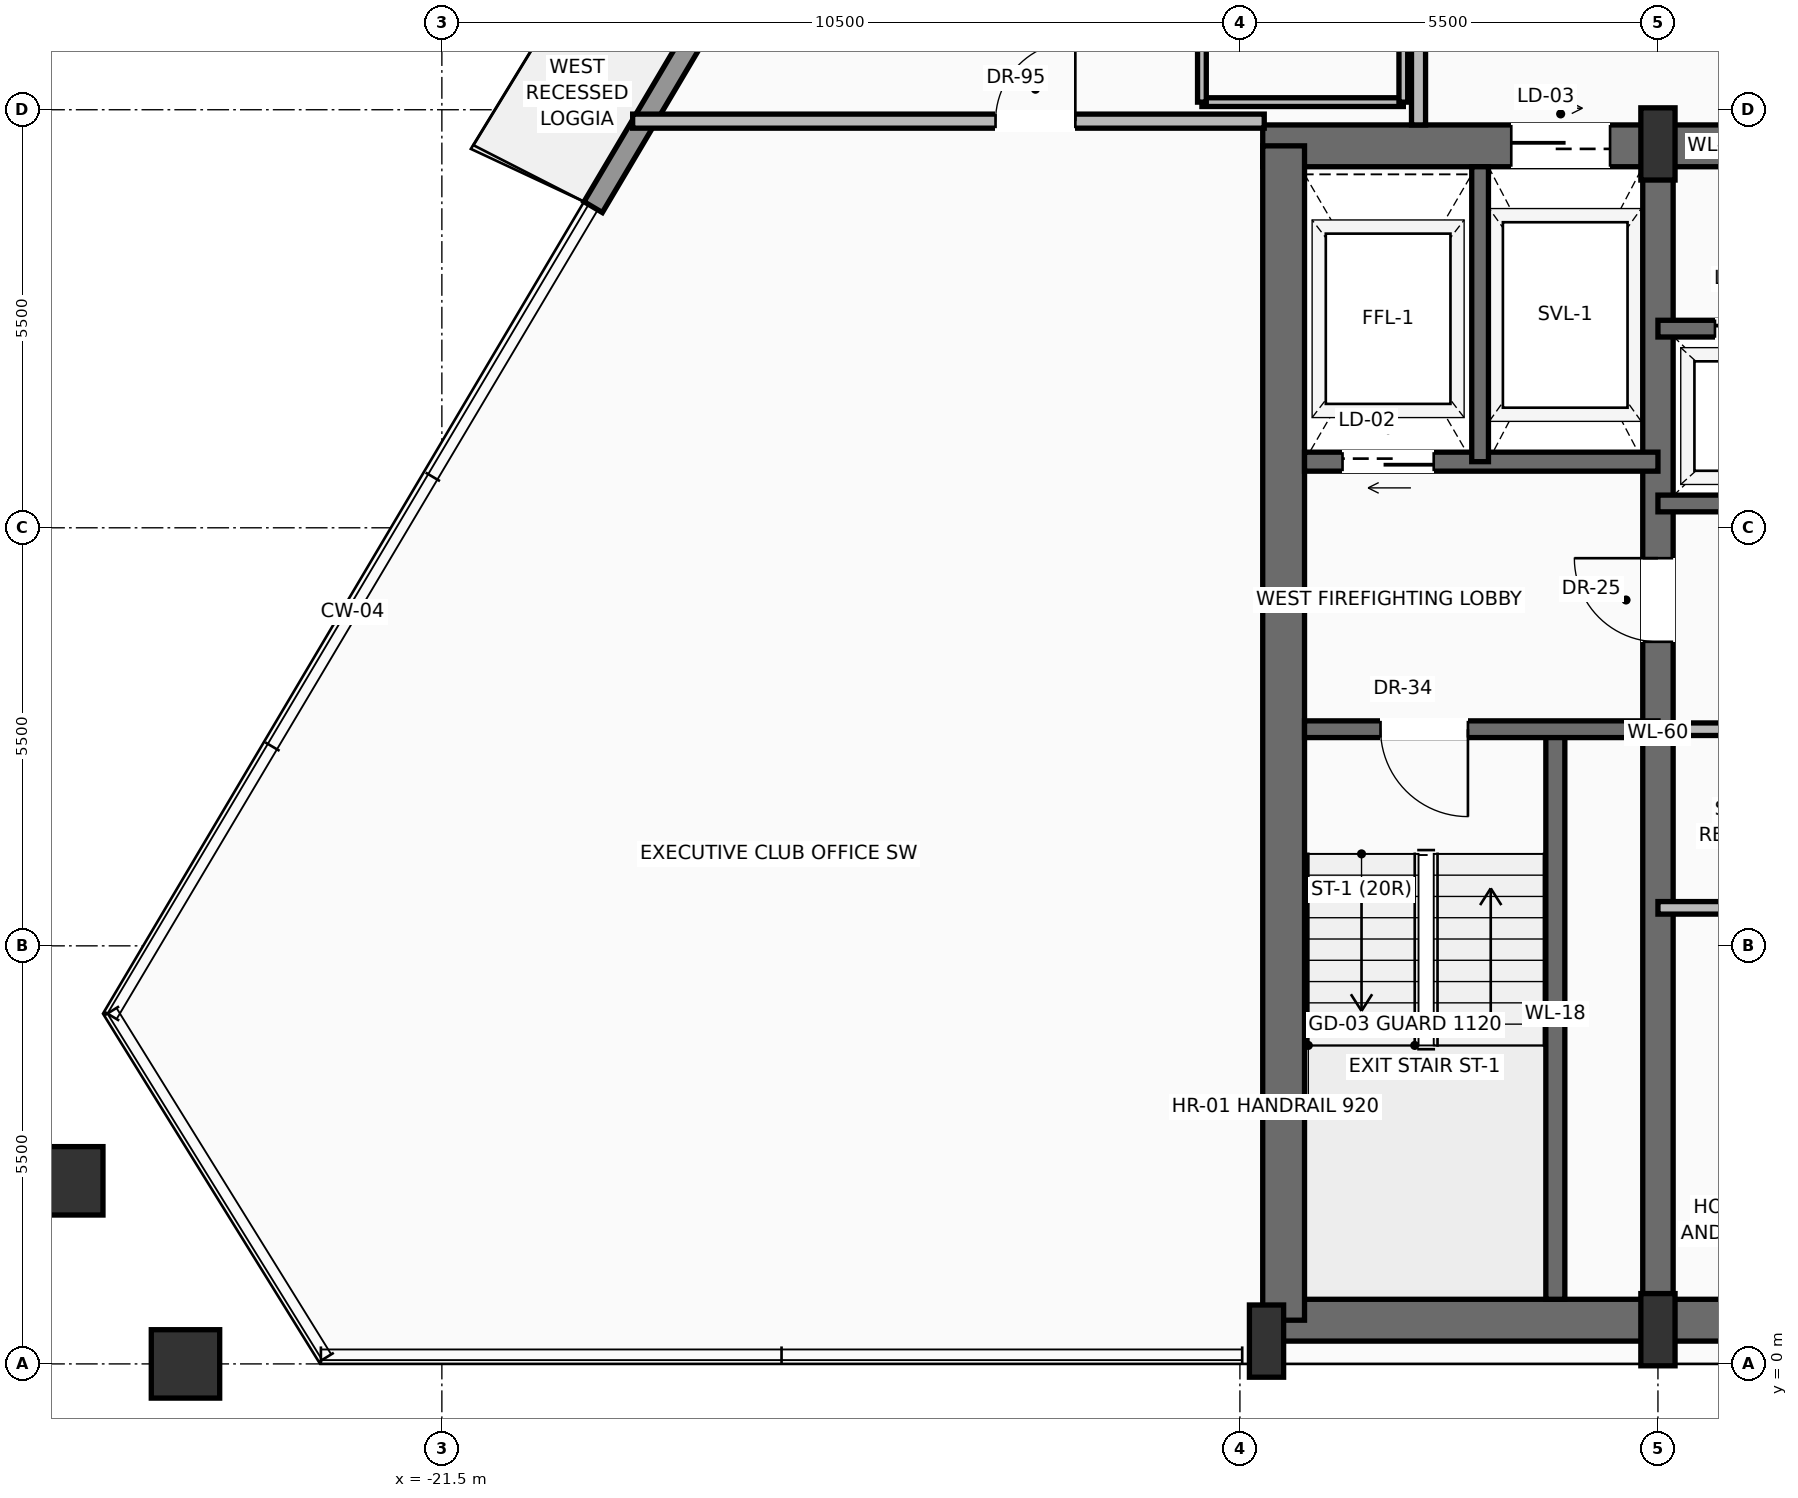
"""IFC4 building model, lengths in metres.
Left out: names, types, materials, properties, quantities, classifications, styles, units other than length and angle.
Written with IfcOpenShell. Run it as: python <this file> out.ifc"""

import sys

from ifc_helpers import new_model, si_unit, direction, frame, frame_2d, origin, origin_2d, place, context, subcontext, project, spatial, rectangle, hollow_rectangle, extrude, source, transform, mapped, element, fill, save


model = new_model("IFC4")
c1 = context("Model", 3, precision=1e-05, world=origin(), true_north=direction((0.0, 1.0)))
c2 = subcontext(c1, "Body", "Model", "MODEL_VIEW")
j1 = project(units=[si_unit("LENGTHUNIT", "METRE"), si_unit("PLANEANGLEUNIT", "RADIAN")], contexts=[c1])
p1 = place(None, origin())
s1 = spatial("IfcSite", under=j1, at=p1, CompositionType="ELEMENT")
p2 = place(p1, origin())
s2 = spatial("IfcBuilding", under=s1, at=p2, CompositionType="ELEMENT")
p3 = place(p2, frame((0.0, 0.0, 233.8)))
s3 = spatial("IfcBuildingStorey", under=s2, at=p3, CompositionType="ELEMENT", Elevation=233.8)
p4 = place(p3, frame((-10.65, 0.575, 0.0), z_axis=(0.0, 0.0, 1.0), x_axis=(1.0, 0.0, 0.0)))
e1 = element("IfcWall", 1, at=p4, inside=s3, PredefinedType="SHEAR", context=c2, shape_type="SweptSolid", body=[
    extrude(rectangle(XDim=21.3, YDim=0.55, at=frame_2d((10.65, 0.0))), origin(), (0.0, 0.0, 1.0), 3.24),
])
p5 = place(p3, frame((-10.7, 16.025, 0.0), z_axis=(0.0, 0.0, 1.0), x_axis=(1.0, 0.0, 0.0)))
e2 = element("IfcWall", 2, at=p5, inside=s3, PredefinedType="SHEAR", context=c2, shape_type="SweptSolid", body=[
    extrude(rectangle(XDim=21.4, YDim=0.55, at=frame_2d((10.7, 0.0))), origin(), (0.0, 0.0, 1.0), 3.24),
])
p6 = place(p5, frame((3.27, 0.0, 0.0)))
e3 = element("IfcOpeningElement", 3, at=p6, cuts=e2, PredefinedType="OPENING", context=c2, shape_type="SweptSolid", body=[
    extrude(rectangle(XDim=1.3, YDim=2.3, at=frame_2d((0.65, 1.15))), frame((0.0, 0.285, 0.0), z_axis=(0.0, -1.0, 0.0), x_axis=(1.0, 0.0, 0.0)), (0.0, 0.0, 1.0), 0.57),
])
p7 = place(p5, frame((9.7, 0.0, 0.0)))
e4 = element("IfcOpeningElement", 4, at=p7, cuts=e2, PredefinedType="OPENING", context=c2, shape_type="SweptSolid", body=[
    extrude(rectangle(XDim=2.0, YDim=2.4, at=frame_2d((1.0, 1.2))), frame((0.0, 0.285, 0.0), z_axis=(0.0, -1.0, 0.0), x_axis=(1.0, 0.0, 0.0)), (0.0, 0.0, 1.0), 0.57),
])
p8 = place(p3, frame((-10.425, 0.575, 0.0), z_axis=(0.0, 0.0, 1.0), x_axis=(0.0, 1.0, 0.0)))
e5 = element("IfcWall", 5, at=p8, inside=s3, PredefinedType="SHEAR", context=c2, shape_type="SweptSolid", body=[
    extrude(rectangle(XDim=15.45, YDim=0.55, at=frame_2d((7.725, 0.0))), origin(), (0.0, 0.0, 1.0), 3.24),
])
p9 = place(p3, frame((-5.5, 0.575, 0.0), z_axis=(0.0, 0.0, 1.0), x_axis=(0.0, 1.0, 0.0)))
e6 = element("IfcWall", 6, at=p9, inside=s3, PredefinedType="SHEAR", context=c2, shape_type="SweptSolid", body=[
    extrude(rectangle(XDim=15.45, YDim=0.4, at=frame_2d((7.725, 0.0))), origin(), (0.0, 0.0, 1.0), 3.24),
])
p10 = place(p9, frame((8.925, 0.0, 0.0)))
e7 = element("IfcOpeningElement", 7, at=p10, cuts=e6, PredefinedType="OPENING", context=c2, shape_type="SweptSolid", body=[
    extrude(rectangle(XDim=1.1, YDim=2.2, at=frame_2d((0.55, 1.1))), frame((0.0, 0.21, 0.0), z_axis=(0.0, -1.0, 0.0), x_axis=(1.0, 0.0, 0.0)), (0.0, 0.0, 1.0), 0.42),
])
m1 = source(origin(), c2, "Body", "SweptSolid", [
    extrude(rectangle(XDim=0.45, YDim=0.95, at=origin_2d()), origin(), (0.0, 0.0, 1.0), 3.45),
])
for number, where, z_axis, x_axis in (
    (8, (-10.65, 0.3, 0.0), (0.0, 0.0, 1.0), (1.0, 0.0, 0.0)),
    (9, (-5.5, 0.45, 0.0), (0.0, 0.0, 1.0), (1.0, 0.0, 0.0)),
    (10, (-5.5, 16.05, 0.0), (0.0, 0.0, 1.0), (1.0, 0.0, 0.0)),
):
    element("IfcColumn", number, at=place(p3, frame(where, z_axis=z_axis, x_axis=x_axis)), inside=s3, PredefinedType="PILASTER", context=c2, shape_type="MappedRepresentation", body=[
        mapped(m1, transform((0.0, 0.0, 0.0), scale=1.0)),
    ])
m2 = source(origin(), c2, "Body", "SweptSolid", [
    extrude(hollow_rectangle(XDim=0.9, YDim=0.9, WallThickness=0.045, at=origin_2d()), origin(), (0.0, 0.0, 1.0), 3.441),
])
p11 = place(p3, frame((-24.873, 0.0, 0.004), z_axis=(-0.0035473349, 0.0, 0.999993708188), x_axis=(0.0, -1.0, 0.0)))
e11 = element("IfcColumn", 11, at=p11, inside=s3, PredefinedType="COLUMN", context=c2, shape_type="MappedRepresentation", body=[
    mapped(m2, transform((0.0, 0.0, 0.0), scale=1.0)),
])
m3 = source(origin(), c2, "Body", "SweptSolid", [
    extrude(hollow_rectangle(XDim=0.9, YDim=0.9, WallThickness=0.045, at=origin_2d()), origin(), (0.0, 0.0, 1.0), 3.442),
])
p12 = place(p3, frame((-26.409, 2.409, 0.004), z_axis=(0.008582991744, -0.017378784935, 0.999812137397), x_axis=(0.896612194763, 0.442816634965, 0.0)))
e12 = element("IfcColumn", 12, at=p12, inside=s3, PredefinedType="COLUMN", context=c2, shape_type="MappedRepresentation", body=[
    mapped(m3, transform((0.0, 0.0, 0.0), scale=1.0)),
])
p13 = place(p3, frame((-19.509, 15.219, 0.0), z_axis=(0.0, 0.0, 1.0), x_axis=(0.509744081024, 0.860326084611, 0.0)))
e13 = element("IfcWall", 13, at=p13, inside=s3, PredefinedType="SOLIDWALL", context=c2, shape_type="SweptSolid", body=[
    extrude(rectangle(XDim=19.511, YDim=0.28, at=frame_2d((9.756, 0.0))), origin(), (0.0, 0.0, 1.0), 2.82),
])
p14 = place(p13, frame((4.683, 0.0, 0.0)))
e14 = element("IfcOpeningElement", 14, at=p14, cuts=e13, PredefinedType="OPENING", context=c2, shape_type="SweptSolid", body=[
    extrude(rectangle(XDim=1.6, YDim=2.35, at=frame_2d((0.8, 1.175))), frame((0.0, 0.15, 0.0), z_axis=(0.0, -1.0, 0.0), x_axis=(1.0, 0.0, 0.0)), (0.0, 0.0, 1.0), 0.3),
])
p15 = place(p13, frame((13.268, 0.0, 0.9)))
e15 = element("IfcOpeningElement", 15, at=p15, cuts=e13, PredefinedType="OPENING", context=c2, shape_type="SweptSolid", body=[
    extrude(rectangle(XDim=2.0, YDim=1.75, at=frame_2d((1.0, 0.875))), frame((0.0, 0.15, 0.0), z_axis=(0.0, -1.0, 0.0), x_axis=(1.0, 0.0, 0.0)), (0.0, 0.0, 1.0), 0.3),
])
p16 = place(p3, frame((-6.85, 0.85, 0.0), z_axis=(0.0, 0.0, 1.0), x_axis=(0.0, 1.0, 0.0)))
e16 = element("IfcWall", 16, at=p16, inside=s3, PredefinedType="SOLIDWALL", context=c2, shape_type="SweptSolid", body=[
    extrude(rectangle(XDim=7.5, YDim=0.25, at=frame_2d((3.75, 0.0))), origin(), (0.0, 0.0, 1.0), 3.24),
])
p17 = place(p3, frame((-5.5, 8.35, 0.0), z_axis=(0.0, 0.0, 1.0), x_axis=(-1.0, 0.0, 0.0)))
e17 = element("IfcWall", 17, at=p17, inside=s3, PredefinedType="SOLIDWALL", context=c2, shape_type="SweptSolid", body=[
    extrude(rectangle(XDim=4.65, YDim=0.22, at=frame_2d((2.325, 0.0))), origin(), (0.0, 0.0, 1.0), 3.24),
])
p18 = place(p17, frame((2.5, 0.0, 0.0)))
e18 = element("IfcOpeningElement", 18, at=p18, cuts=e17, PredefinedType="OPENING", context=c2, shape_type="SweptSolid", body=[
    extrude(rectangle(XDim=1.15, YDim=2.2, at=frame_2d((0.575, 1.1))), frame((0.0, 0.12, 0.0), z_axis=(0.0, -1.0, 0.0), x_axis=(1.0, 0.0, 0.0)), (0.0, 0.0, 1.0), 0.24),
])
p19 = place(p3, frame((-5.5, 11.87, 0.0), z_axis=(0.0, 0.0, 1.0), x_axis=(-1.0, 0.0, 0.0)))
e19 = element("IfcWall", 19, at=p19, inside=s3, PredefinedType="SOLIDWALL", context=c2, shape_type="SweptSolid", body=[
    extrude(rectangle(XDim=4.65, YDim=0.25, at=frame_2d((2.325, 0.0))), origin(), (0.0, 0.0, 1.0), 3.24),
])
p20 = place(p19, frame((2.95, 0.0, 0.0)))
e20 = element("IfcOpeningElement", 20, at=p20, cuts=e19, PredefinedType="OPENING", context=c2, shape_type="SweptSolid", body=[
    extrude(rectangle(XDim=1.2, YDim=2.25, at=frame_2d((0.6, 1.125))), frame((0.0, 0.135, 0.0), z_axis=(0.0, -1.0, 0.0), x_axis=(1.0, 0.0, 0.0)), (0.0, 0.0, 1.0), 0.27),
])
p21 = place(p3, frame((-7.84, 11.87, 0.0), z_axis=(0.0, 0.0, 1.0), x_axis=(0.0, 1.0, 0.0)))
e21 = element("IfcWall", 21, at=p21, inside=s3, PredefinedType="SOLIDWALL", context=c2, shape_type="SweptSolid", body=[
    extrude(rectangle(XDim=3.88, YDim=0.22, at=frame_2d((1.94, 0.0))), origin(), (0.0, 0.0, 1.0), 3.24),
])
p22 = place(p3, frame((-5.5, 6.0, 0.0), z_axis=(0.0, 0.0, 1.0), x_axis=(1.0, 0.0, 0.0)))
e22 = element("IfcWall", 22, at=p22, inside=s3, PredefinedType="PARTITIONING", context=c2, shape_type="SweptSolid", body=[
    extrude(rectangle(XDim=10.8, YDim=0.165, at=frame_2d((5.4, 0.0))), origin(), (0.0, 0.0, 1.0), 3.232),
])
p23 = place(p22, frame((7.7, 0.0, 0.0)))
e23 = element("IfcOpeningElement", 23, at=p23, cuts=e22, PredefinedType="OPENING", context=c2, shape_type="SweptSolid", body=[
    extrude(rectangle(XDim=0.9, YDim=2.1, at=frame_2d((0.45, 1.05))), frame((0.0, 0.093, 0.0), z_axis=(0.0, -1.0, 0.0), x_axis=(1.0, 0.0, 0.0)), (0.0, 0.0, 1.0), 0.185),
])
p24 = place(p3, frame((-5.3, 8.35, 0.0), z_axis=(0.0, 0.0, 1.0), x_axis=(1.0, 0.0, 0.0)))
e24 = element("IfcWall", 24, at=p24, inside=s3, PredefinedType="PARTITIONING", context=c2, shape_type="SweptSolid", body=[
    extrude(rectangle(XDim=7.12, YDim=0.165, at=frame_2d((3.56, 0.0))), origin(), (0.0, 0.0, 1.0), 3.232),
])
p25 = place(p24, frame((0.85, 0.0, 0.0)))
e25 = element("IfcOpeningElement", 25, at=p25, cuts=e24, PredefinedType="OPENING", context=c2, shape_type="SweptSolid", body=[
    extrude(rectangle(XDim=0.9, YDim=2.1, at=frame_2d((0.45, 1.05))), frame((0.0, 0.093, 0.0), z_axis=(0.0, -1.0, 0.0), x_axis=(1.0, 0.0, 0.0)), (0.0, 0.0, 1.0), 0.185),
])
p26 = place(p24, frame((3.25, 0.0, 0.0)))
e26 = element("IfcOpeningElement", 26, at=p26, cuts=e24, PredefinedType="OPENING", context=c2, shape_type="SweptSolid", body=[
    extrude(rectangle(XDim=0.9, YDim=2.1, at=frame_2d((0.45, 1.05))), frame((0.0, 0.093, 0.0), z_axis=(0.0, -1.0, 0.0), x_axis=(1.0, 0.0, 0.0)), (0.0, 0.0, 1.0), 0.185),
])
p27 = place(p3, frame((-5.5, 11.32, 0.0), z_axis=(0.0, 0.0, 1.0), x_axis=(1.0, 0.0, 0.0)))
e27 = element("IfcWall", 27, at=p27, inside=s3, PredefinedType="SOLIDWALL", context=c2, shape_type="SweptSolid", body=[
    extrude(rectangle(XDim=7.32, YDim=0.22, at=frame_2d((3.66, 0.0))), origin(), (0.0, 0.0, 1.0), 3.24),
])
p28 = place(p3, frame((-5.5, 13.62, 0.0), z_axis=(0.0, 0.0, 1.0), x_axis=(1.0, 0.0, 0.0)))
e28 = element("IfcWall", 28, at=p28, inside=s3, PredefinedType="SOLIDWALL", context=c2, shape_type="SweptSolid", body=[
    extrude(rectangle(XDim=7.32, YDim=0.22, at=frame_2d((3.66, 0.0))), origin(), (0.0, 0.0, 1.0), 3.24),
])
p29 = place(p28, frame((0.75, 0.0, 0.0)))
e29 = element("IfcOpeningElement", 29, at=p29, cuts=e28, PredefinedType="OPENING", context=c2, shape_type="SweptSolid", body=[
    extrude(rectangle(XDim=1.1, YDim=2.2, at=frame_2d((0.55, 1.1))), frame((0.0, 0.12, 0.0), z_axis=(0.0, -1.0, 0.0), x_axis=(1.0, 0.0, 0.0)), (0.0, 0.0, 1.0), 0.24),
])
p30 = place(p28, frame((3.15, 0.0, 0.0)))
e30 = element("IfcOpeningElement", 30, at=p30, cuts=e28, PredefinedType="OPENING", context=c2, shape_type="SweptSolid", body=[
    extrude(rectangle(XDim=1.1, YDim=2.2, at=frame_2d((0.55, 1.1))), frame((0.0, 0.12, 0.0), z_axis=(0.0, -1.0, 0.0), x_axis=(1.0, 0.0, 0.0)), (0.0, 0.0, 1.0), 0.24),
])
p31 = place(p28, frame((5.55, 0.0, 0.0)))
e31 = element("IfcOpeningElement", 31, at=p31, cuts=e28, PredefinedType="OPENING", context=c2, shape_type="SweptSolid", body=[
    extrude(rectangle(XDim=1.1, YDim=2.2, at=frame_2d((0.55, 1.1))), frame((0.0, 0.12, 0.0), z_axis=(0.0, -1.0, 0.0), x_axis=(1.0, 0.0, 0.0)), (0.0, 0.0, 1.0), 0.24),
])
p32 = place(p3, frame((-8.65, 16.3, 0.0), z_axis=(0.0, 0.0, 1.0), x_axis=(0.0, 1.0, 0.0)))
e32 = element("IfcWall", 32, at=p32, inside=s3, PredefinedType="PARTITIONING", context=c2, shape_type="SweptSolid", body=[
    extrude(rectangle(XDim=10.5, YDim=0.185, at=frame_2d((5.25, 0.0))), origin(), (0.0, 0.0, 1.0), 3.232),
])
p33 = place(p32, frame((2.854, 0.0, 0.0)))
e33 = element("IfcOpeningElement", 33, at=p33, cuts=e32, PredefinedType="OPENING", context=c2, shape_type="SweptSolid", body=[
    extrude(rectangle(XDim=1.05, YDim=2.25, at=frame_2d((0.525, 1.125))), frame((0.0, 0.103, 0.0), z_axis=(0.0, -1.0, 0.0), x_axis=(1.0, 0.0, 0.0)), (0.0, 0.0, 1.0), 0.205),
])
p34 = place(p32, frame((5.752, 0.0, 0.0)))
e34 = element("IfcOpeningElement", 34, at=p34, cuts=e32, PredefinedType="OPENING", context=c2, shape_type="SweptSolid", body=[
    extrude(rectangle(XDim=1.05, YDim=2.25, at=frame_2d((0.525, 1.125))), frame((0.0, 0.103, 0.0), z_axis=(0.0, -1.0, 0.0), x_axis=(1.0, 0.0, 0.0)), (0.0, 0.0, 1.0), 0.205),
])
p35 = place(p32, frame((8.457, 0.0, 0.0)))
e35 = element("IfcOpeningElement", 35, at=p35, cuts=e32, PredefinedType="OPENING", context=c2, shape_type="SweptSolid", body=[
    extrude(rectangle(XDim=1.05, YDim=2.25, at=frame_2d((0.525, 1.125))), frame((0.0, 0.103, 0.0), z_axis=(0.0, -1.0, 0.0), x_axis=(1.0, 0.0, 0.0)), (0.0, 0.0, 1.0), 0.205),
])
p36 = place(p3, frame((-18.99, 16.35, 0.0), z_axis=(0.0, 0.0, 1.0), x_axis=(1.0, 0.0, 0.0)))
e36 = element("IfcWall", 36, at=p36, inside=s3, PredefinedType="PARTITIONING", context=c2, shape_type="SweptSolid", body=[
    extrude(rectangle(XDim=8.31, YDim=0.185, at=frame_2d((4.155, 0.0))), origin(), (0.0, 0.0, 1.0), 3.232),
])
p37 = place(p36, frame((4.774, 0.0, 0.0)))
e37 = element("IfcOpeningElement", 37, at=p37, cuts=e36, PredefinedType="OPENING", context=c2, shape_type="SweptSolid", body=[
    extrude(rectangle(XDim=1.05, YDim=2.25, at=frame_2d((0.525, 1.125))), frame((0.0, 0.103, 0.0), z_axis=(0.0, -1.0, 0.0), x_axis=(1.0, 0.0, 0.0)), (0.0, 0.0, 1.0), 0.205),
])
p38 = place(p3, frame((-11.5, 16.6, 0.0), z_axis=(0.0, 0.0, 1.0), x_axis=(1.0, 0.0, 0.0)))
e38 = element("IfcWall", 38, at=p38, inside=s3, PredefinedType="PARTITIONING", context=c2, shape_type="SweptSolid", body=[
    extrude(rectangle(XDim=2.65, YDim=0.115, at=frame_2d((1.325, 0.0))), origin(), (0.0, 0.0, 1.0), 3.232),
])
p39 = place(p3, frame((-11.5, 16.6, 0.0), z_axis=(0.0, 0.0, 1.0), x_axis=(0.0, 1.0, 0.0)))
e39 = element("IfcWall", 39, at=p39, inside=s3, PredefinedType="PARTITIONING", context=c2, shape_type="SweptSolid", body=[
    extrude(rectangle(XDim=2.4, YDim=0.115, at=frame_2d((1.2, 0.0))), origin(), (0.0, 0.0, 1.0), 3.232),
])
p40 = place(p39, frame((0.75, 0.0, 0.0)))
e40 = element("IfcOpeningElement", 40, at=p40, cuts=e39, PredefinedType="OPENING", context=c2, shape_type="SweptSolid", body=[
    extrude(rectangle(XDim=0.9, YDim=2.15, at=frame_2d((0.45, 1.075))), frame((0.0, 0.067, 0.0), z_axis=(0.0, -1.0, 0.0), x_axis=(1.0, 0.0, 0.0)), (0.0, 0.0, 1.0), 0.135),
])
p41 = place(p3, frame((-8.85, 16.6, 0.0), z_axis=(0.0, 0.0, 1.0), x_axis=(0.0, 1.0, 0.0)))
e41 = element("IfcWall", 41, at=p41, inside=s3, PredefinedType="PARTITIONING", context=c2, shape_type="SweptSolid", body=[
    extrude(rectangle(XDim=2.4, YDim=0.115, at=frame_2d((1.2, 0.0))), origin(), (0.0, 0.0, 1.0), 3.232),
])
m4 = source(origin(), c2, "Body", "SweptSolid", [
    extrude(rectangle(XDim=1.15, YDim=2.2, at=frame_2d((0.575, 1.1))), frame((0.0, 0.025, 0.0), z_axis=(0.0, -1.0, 0.0), x_axis=(1.0, 0.0, 0.0)), (0.0, 0.0, 1.0), 0.05),
])
p42 = place(p18, origin())
e42 = element("IfcDoor", 42, at=p42, inside=s3, OperationType="SINGLE_SWING_LEFT", PredefinedType="DOOR", context=c2, shape_type="MappedRepresentation", body=[
    mapped(m4, transform((0.0, 0.0, 0.0), scale=1.0)),
])
fill(e18, e42)
m5 = source(origin(), c2, "Body", "SweptSolid", [
    extrude(rectangle(XDim=1.1, YDim=2.2, at=frame_2d((0.55, 1.1))), frame((0.0, 0.025, 0.0), z_axis=(0.0, -1.0, 0.0), x_axis=(1.0, 0.0, 0.0)), (0.0, 0.0, 1.0), 0.05),
])
p43 = place(p10, origin())
e43 = element("IfcDoor", 43, at=p43, inside=s3, OperationType="SINGLE_SWING_RIGHT", PredefinedType="DOOR", context=c2, shape_type="MappedRepresentation", body=[
    mapped(m5, transform((0.0, 0.0, 0.0), scale=1.0)),
])
fill(e7, e43)
m6 = source(origin(), c2, "Body", "SweptSolid", [
    extrude(rectangle(XDim=1.2, YDim=2.25, at=frame_2d((0.6, 1.125))), frame((0.0, 0.025, 0.0), z_axis=(0.0, -1.0, 0.0), x_axis=(1.0, 0.0, 0.0)), (0.0, 0.0, 1.0), 0.05),
])
p44 = place(p20, origin())
e44 = element("IfcDoor", 44, at=p44, inside=s3, OperationType="SLIDING_TO_LEFT", PredefinedType="DOOR", context=c2, shape_type="MappedRepresentation", body=[
    mapped(m6, transform((0.0, 0.0, 0.0), scale=1.0)),
])
fill(e20, e44)
m7 = source(origin(), c2, "Body", "SweptSolid", [
    extrude(rectangle(XDim=1.3, YDim=2.3, at=frame_2d((0.65, 1.15))), frame((0.0, 0.025, 0.0), z_axis=(0.0, -1.0, 0.0), x_axis=(1.0, 0.0, 0.0)), (0.0, 0.0, 1.0), 0.05),
])
p45 = place(p6, origin())
e45 = element("IfcDoor", 45, at=p45, inside=s3, OperationType="SLIDING_TO_RIGHT", PredefinedType="DOOR", context=c2, shape_type="MappedRepresentation", body=[
    mapped(m7, transform((0.0, 0.0, 0.0), scale=1.0)),
])
fill(e3, e45)
m8 = source(origin(), c2, "Body", "SweptSolid", [
    extrude(rectangle(XDim=1.1, YDim=2.2, at=frame_2d((0.55, 1.1))), frame((0.0, 0.025, 0.0), z_axis=(0.0, -1.0, 0.0), x_axis=(1.0, 0.0, 0.0)), (0.0, 0.0, 1.0), 0.05),
])
p46 = place(p29, origin())
e46 = element("IfcDoor", 46, at=p46, inside=s3, OperationType="SLIDING_TO_RIGHT", PredefinedType="DOOR", context=c2, shape_type="MappedRepresentation", body=[
    mapped(m8, transform((0.0, 0.0, 0.0), scale=1.0)),
])
fill(e29, e46)
m9 = source(origin(), c2, "Body", "SweptSolid", [
    extrude(rectangle(XDim=1.05, YDim=2.25, at=frame_2d((0.525, 1.125))), frame((0.0, 0.025, 0.0), z_axis=(0.0, -1.0, 0.0), x_axis=(1.0, 0.0, 0.0)), (0.0, 0.0, 1.0), 0.05),
])
p47 = place(p37, origin())
e47 = element("IfcDoor", 47, at=p47, inside=s3, OperationType="SINGLE_SWING_RIGHT", PredefinedType="DOOR", context=c2, shape_type="MappedRepresentation", body=[
    mapped(m9, transform((0.0, 0.0, 0.0), scale=1.0)),
])
fill(e37, e47)
save(model, sys.argv[1])
